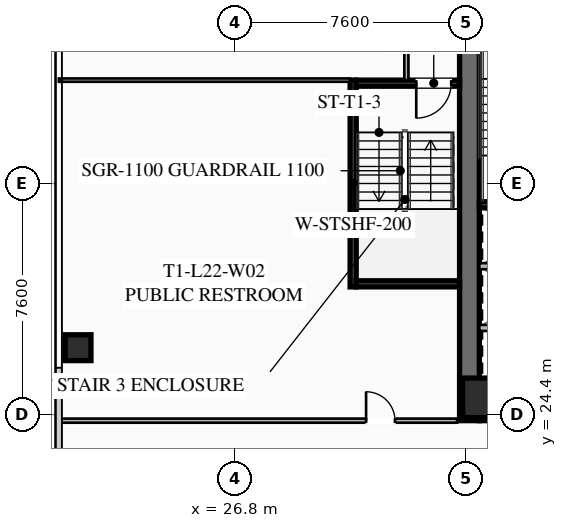
"""IFC4 building model, lengths in metres.
Left out: names, types, materials, properties, quantities, classifications, styles, units other than length and angle.
Written with IfcOpenShell. Run it as: python <this file> out.ifc"""

import sys

from ifc_helpers import new_model, si_unit, direction, frame, frame_2d, origin, origin_2d, place, context, subcontext, project, spatial, rectangle, hollow_rectangle, extrude, element, fill, save


model = new_model("IFC4")
c1 = context("Model", 3, precision=1e-05, world=origin(), true_north=direction((0.0, 1.0)))
c2 = subcontext(c1, "Body", "Model", "MODEL_VIEW")
j1 = project(units=[si_unit("LENGTHUNIT", "METRE"), si_unit("PLANEANGLEUNIT", "RADIAN")], contexts=[c1])
p1 = place(None, origin())
s1 = spatial("IfcSite", under=j1, at=p1, CompositionType="ELEMENT")
p2 = place(p1, origin())
s2 = spatial("IfcBuilding", under=s1, at=p2, CompositionType="ELEMENT")
p3 = place(p2, frame((0.0, 0.0, 84.95)))
s3 = spatial("IfcBuildingStorey", under=s2, at=p3, CompositionType="ELEMENT", Elevation=84.95)
p4 = place(p3, frame((34.525, 24.2, 0.0), z_axis=(0.0, 0.0, 1.0), x_axis=(0.0, 1.0, 0.0)))
e1 = element("IfcWall", 1, at=p4, inside=s3, PredefinedType="SHEAR", context=c2, shape_type="SweptSolid", body=[
    extrude(rectangle(XDim=15.6, YDim=0.65, at=frame_2d((7.8, 0.0))), origin(), (0.0, 0.0, 1.0), 3.55),
])
p5 = place(p3, frame((49.15, 24.525, 0.0), z_axis=(0.0, 0.0, 1.0), x_axis=(-1.0, 0.0, 0.0)))
e2 = element("IfcWall", 2, at=p5, inside=s3, PredefinedType="SHEAR", context=c2, shape_type="SweptSolid", body=[
    extrude(rectangle(XDim=14.3, YDim=0.65, at=frame_2d((7.15, 0.0))), origin(), (0.0, 0.0, 1.0), 3.55),
])
p6 = place(p5, frame((8.85, 0.0, 0.0)))
e3 = element("IfcOpeningElement", 3, at=p6, cuts=e2, PredefinedType="OPENING", context=c2, shape_type="SweptSolid", body=[
    extrude(rectangle(XDim=1.25, YDim=2.25, at=frame_2d((0.625, 1.125))), frame((0.0, 0.335, 0.0), z_axis=(0.0, -1.0, 0.0), x_axis=(1.0, 0.0, 0.0)), (0.0, 0.0, 1.0), 0.67),
])
p7 = place(p5, frame((3.8, 0.0, 0.0)))
e4 = element("IfcOpeningElement", 4, at=p7, cuts=e2, PredefinedType="OPENING", context=c2, shape_type="SweptSolid", body=[
    extrude(rectangle(XDim=1.25, YDim=2.25, at=frame_2d((0.625, 1.125))), frame((0.0, 0.335, 0.0), z_axis=(0.0, -1.0, 0.0), x_axis=(1.0, 0.0, 0.0)), (0.0, 0.0, 1.0), 0.67),
])
p8 = place(p3, frame((34.95, 24.95, 0.0), z_axis=(0.0, 0.0, 1.0), x_axis=(1.0, 0.0, 0.0)))
e5 = element("IfcColumn", 5, at=p8, inside=s3, PredefinedType="COLUMN", context=c2, shape_type="SweptSolid", body=[
    extrude(hollow_rectangle(XDim=1.3, YDim=1.3, WallThickness=0.05, at=origin_2d()), origin(), (0.0, 0.0, 1.0), 3.35),
])
p9 = place(p3, frame((21.65, 26.6, 0.0), z_axis=(0.0, 0.0, 1.0), x_axis=(1.0, 0.0, 0.0)))
e6 = element("IfcColumn", 6, at=p9, inside=s3, PredefinedType="COLUMN", context=c2, shape_type="SweptSolid", body=[
    extrude(hollow_rectangle(XDim=0.85, YDim=0.85, WallThickness=0.035, at=origin_2d()), origin(), (0.0, 0.0, 1.0), 3.35),
])
p10 = place(p3, frame((34.85, 31.3, 0.0), z_axis=(0.0, 0.0, 1.0), x_axis=(1.0, 0.0, 0.0)))
e7 = element("IfcWall", 7, at=p10, inside=s3, PredefinedType="SHEAR", context=c2, shape_type="SweptSolid", body=[
    extrude(rectangle(XDim=3.45, YDim=0.2, at=frame_2d((1.725, 0.0))), origin(), (0.0, 0.0, 1.0), 3.35),
])
for number, where, z_axis, x_axis in (
    (8, (34.85, 27.25, 0.0), (0.0, 0.0, 1.0), (1.0, 0.0, 0.0)),
    (9, (34.85, 29.28, 0.0), (0.0, 0.0, 1.0), (1.0, 0.0, 0.0)),
):
    element("IfcWall", number, at=place(p3, frame(where, z_axis=z_axis, x_axis=x_axis)), inside=s3, PredefinedType="SOLIDWALL", context=c2, shape_type="SweptSolid", body=[
        extrude(rectangle(XDim=3.1, YDim=0.2, at=frame_2d((1.55, 0.0))), origin(), (0.0, 0.0, 1.0), 3.35),
    ])
p11 = place(p3, frame((30.7, 28.6, 0.0), z_axis=(0.0, 0.0, 1.0), x_axis=(0.0, 1.0, 0.0)))
e10 = element("IfcWall", 10, at=p11, inside=s3, PredefinedType="SHEAR", context=c2, shape_type="SweptSolid", body=[
    extrude(rectangle(XDim=6.8, YDim=0.2, at=frame_2d((3.4, 0.0))), origin(), (0.0, 0.0, 1.0), 3.35),
])
p12 = place(p3, frame((34.2, 35.3, 0.0), z_axis=(0.0, 0.0, 1.0), x_axis=(-1.0, 0.0, 0.0)))
e11 = element("IfcWall", 11, at=p12, inside=s3, PredefinedType="SHEAR", context=c2, shape_type="SweptSolid", body=[
    extrude(rectangle(XDim=3.4, YDim=0.2, at=frame_2d((1.7, 0.0))), origin(), (0.0, 0.0, 1.0), 3.35),
])
p13 = place(p12, frame((0.275, 0.0, 0.0)))
e12 = element("IfcOpeningElement", 12, at=p13, cuts=e11, PredefinedType="OPENING", context=c2, shape_type="SweptSolid", body=[
    extrude(rectangle(XDim=1.15, YDim=2.2, at=frame_2d((0.575, 1.1))), frame((0.0, 0.11, 0.0), z_axis=(0.0, -1.0, 0.0), x_axis=(1.0, 0.0, 0.0)), (0.0, 0.0, 1.0), 0.22),
])
p14 = place(p3, frame((30.8, 28.7, 0.0), z_axis=(0.0, 0.0, 1.0), x_axis=(1.0, 0.0, 0.0)))
e13 = element("IfcWall", 13, at=p14, inside=s3, PredefinedType="SHEAR", context=c2, shape_type="SweptSolid", body=[
    extrude(rectangle(XDim=3.4, YDim=0.2, at=frame_2d((1.7, 0.0))), origin(), (0.0, 0.0, 1.0), 3.35),
])
p15 = place(p3, frame((32.45, 35.4, 0.0), z_axis=(0.0, 0.0, 1.0), x_axis=(0.0, 1.0, 0.0)))
e14 = element("IfcWall", 14, at=p15, inside=s3, PredefinedType="PARTITIONING", context=c2, shape_type="SweptSolid", body=[
    extrude(rectangle(XDim=4.4, YDim=0.135, at=frame_2d((2.2, 0.0))), origin(), (0.0, 0.0, 1.0), 2.703),
])
p16 = place(p3, frame((21.02, 24.2, 0.0), z_axis=(0.0, 0.0, 1.0), x_axis=(1.0, 0.0, 0.0)))
e15 = element("IfcWall", 15, at=p16, inside=s3, PredefinedType="PARTITIONING", context=c2, shape_type="SweptSolid", body=[
    extrude(rectangle(XDim=13.1, YDim=0.135, at=frame_2d((6.55, 0.0))), origin(), (0.0, 0.0, 1.0), 2.703),
])
p17 = place(p16, frame((10.105, 0.0, 0.0)))
e16 = element("IfcOpeningElement", 16, at=p17, cuts=e15, PredefinedType="OPENING", context=c2, shape_type="SweptSolid", body=[
    extrude(rectangle(XDim=0.95, YDim=2.05, at=frame_2d((0.475, 1.025))), frame((0.0, 0.077, 0.0), z_axis=(0.0, -1.0, 0.0), x_axis=(1.0, 0.0, 0.0)), (0.0, 0.0, 1.0), 0.155),
])
p18 = place(p3, frame((30.6, 35.4, 0.0), z_axis=(0.0, 0.0, 1.0), x_axis=(-1.0, 0.0, 0.0)))
e17 = element("IfcWall", 17, at=p18, inside=s3, PredefinedType="PARTITIONING", context=c2, shape_type="SweptSolid", body=[
    extrude(rectangle(XDim=9.58, YDim=0.11, at=frame_2d((4.79, 0.0))), origin(), (0.0, 0.0, 1.0), 2.703),
])
p19 = place(p13, origin())
e18 = element("IfcDoor", 18, at=p19, inside=s3, OperationType="SINGLE_SWING_RIGHT", PredefinedType="DOOR", context=c2, shape_type="SweptSolid", body=[
    extrude(rectangle(XDim=1.15, YDim=2.2, at=frame_2d((0.575, 1.1))), frame((0.0, 0.025, 0.0), z_axis=(0.0, -1.0, 0.0), x_axis=(1.0, 0.0, 0.0)), (0.0, 0.0, 1.0), 0.05),
])
fill(e12, e18)
p20 = place(p17, origin())
e19 = element("IfcDoor", 19, at=p20, inside=s3, OperationType="SINGLE_SWING_LEFT", PredefinedType="DOOR", context=c2, shape_type="SweptSolid", body=[
    extrude(rectangle(XDim=0.95, YDim=2.05, at=frame_2d((0.475, 1.025))), frame((0.0, 0.025, 0.0), z_axis=(0.0, -1.0, 0.0), x_axis=(1.0, 0.0, 0.0)), (0.0, 0.0, 1.0), 0.05),
])
fill(e16, e19)
save(model, sys.argv[1])
